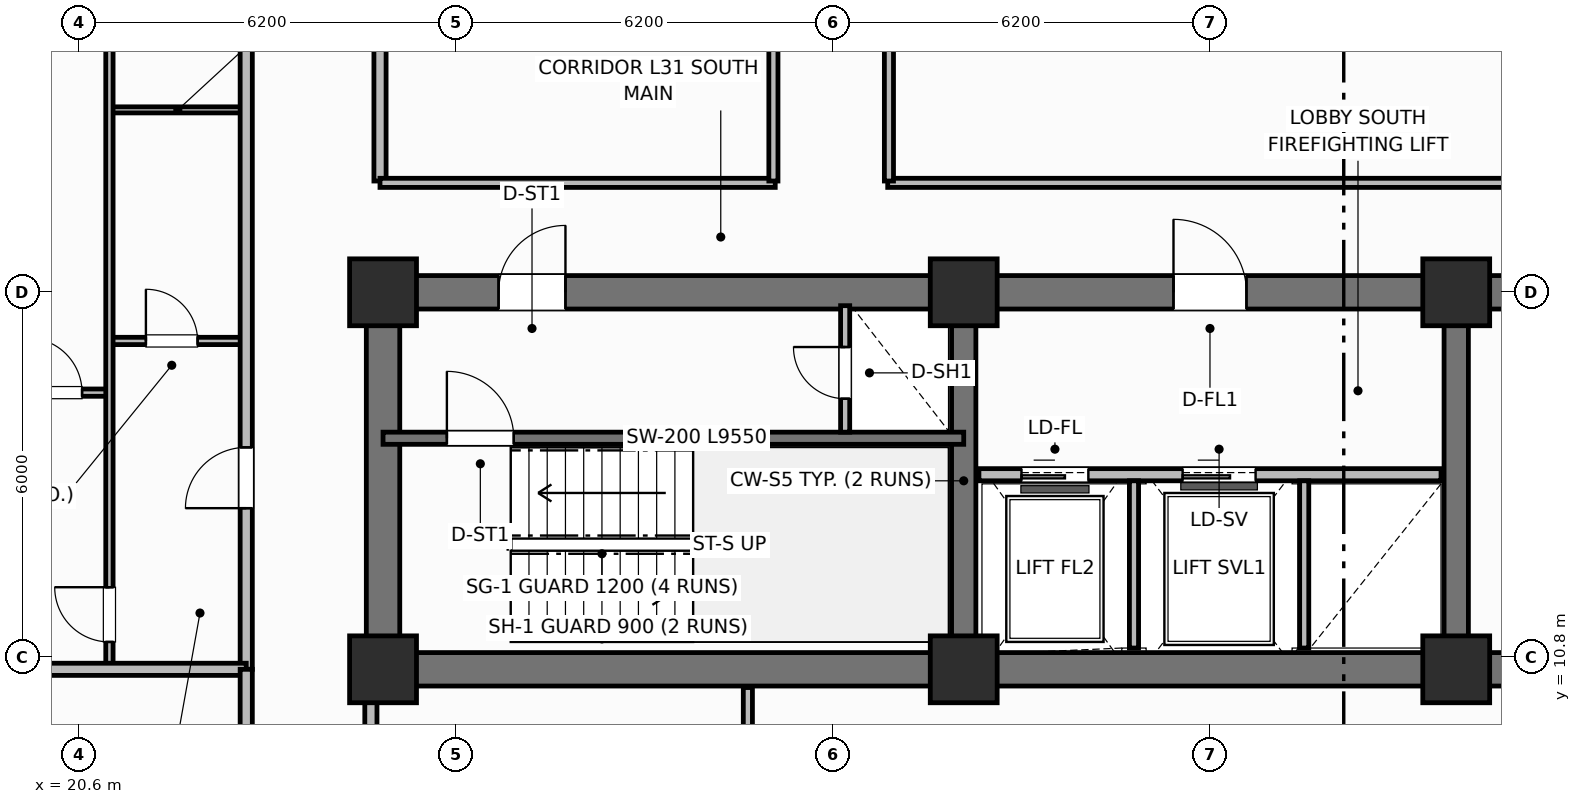
"""IFC4 building model, lengths in metres.
Left out: names, types, materials, properties, quantities, classifications, styles, units other than length and angle.
Written with IfcOpenShell. Run it as: python <this file> out.ifc"""

import sys

from ifc_helpers import new_model, si_unit, direction, frame, frame_2d, origin, origin_2d, place, context, subcontext, project, spatial, rectangle, extrude, element, fill, save


model = new_model("IFC4")
c1 = context("Model", 3, precision=1e-05, world=origin(), true_north=direction((0.0, 1.0)))
c2 = subcontext(c1, "Body", "Model", "MODEL_VIEW")
j1 = project(units=[si_unit("LENGTHUNIT", "METRE"), si_unit("PLANEANGLEUNIT", "RADIAN")], contexts=[c1])
p1 = place(None, origin())
s1 = spatial("IfcSite", under=j1, at=p1, CompositionType="ELEMENT")
p2 = place(p1, origin())
s2 = spatial("IfcBuilding", under=s1, at=p2, CompositionType="ELEMENT")
p3 = place(p2, frame((0.0, 0.0, 125.3)))
s3 = spatial("IfcBuildingStorey", under=s2, at=p3, CompositionType="ELEMENT", Elevation=125.3)
p4 = place(p3, frame((52.8, 10.6, 0.0), z_axis=(0.0, 0.0, 1.0), x_axis=(-1.0, 0.0, 0.0)))
e1 = element("IfcWall", 1, at=p4, inside=s3, PredefinedType="SHEAR", context=c2, shape_type="SweptSolid", body=[
    extrude(rectangle(XDim=27.2, YDim=0.55, at=frame_2d((13.6, 0.0))), origin(), (0.0, 0.0, 1.0), 3.7),
])
p5 = place(p3, frame((25.6, 10.875, 0.0), z_axis=(0.0, 0.0, 1.0), x_axis=(0.0, 1.0, 0.0)))
e2 = element("IfcWall", 2, at=p5, inside=s3, PredefinedType="SHEAR", context=c2, shape_type="SweptSolid", body=[
    extrude(rectangle(XDim=5.65, YDim=0.55, at=frame_2d((2.825, 0.0))), origin(), (0.0, 0.0, 1.0), 3.7),
])
p6 = place(p3, frame((25.6, 16.8, 0.0), z_axis=(0.0, 0.0, 1.0), x_axis=(1.0, 0.0, 0.0)))
e3 = element("IfcWall", 3, at=p6, inside=s3, PredefinedType="SHEAR", context=c2, shape_type="SweptSolid", body=[
    extrude(rectangle(XDim=27.2, YDim=0.55, at=frame_2d((13.6, 0.0))), origin(), (0.0, 0.0, 1.0), 3.7),
])
p7 = place(p6, frame((1.9, 0.0, 0.0)))
e4 = element("IfcOpeningElement", 4, at=p7, cuts=e3, PredefinedType="OPENING", context=c2, shape_type="SweptSolid", body=[
    extrude(rectangle(XDim=1.1, YDim=2.15, at=frame_2d((0.55, 1.075))), frame((0.0, 0.285, 0.0), z_axis=(0.0, -1.0, 0.0), x_axis=(1.0, 0.0, 0.0)), (0.0, 0.0, 1.0), 0.57),
])
p8 = place(p6, frame((13.0, 0.0, 0.0)))
e5 = element("IfcOpeningElement", 5, at=p8, cuts=e3, PredefinedType="OPENING", context=c2, shape_type="SweptSolid", body=[
    extrude(rectangle(XDim=1.2, YDim=2.15, at=frame_2d((0.6, 1.075))), frame((0.0, 0.285, 0.0), z_axis=(0.0, -1.0, 0.0), x_axis=(1.0, 0.0, 0.0)), (0.0, 0.0, 1.0), 0.57),
])
p9 = place(p6, frame((21.6, 0.0, 0.0)))
e6 = element("IfcOpeningElement", 6, at=p9, cuts=e3, PredefinedType="OPENING", context=c2, shape_type="SweptSolid", body=[
    extrude(rectangle(XDim=1.0, YDim=2.15, at=frame_2d((0.5, 1.075))), frame((0.0, 0.285, 0.0), z_axis=(0.0, -1.0, 0.0), x_axis=(1.0, 0.0, 0.0)), (0.0, 0.0, 1.0), 0.57),
])
for number, where, z_axis, x_axis in (
    (7, (35.15, 10.875, 0.0), (0.0, 0.0, 1.0), (0.0, 1.0, 0.0)),
    (8, (43.25, 10.875, 0.0), (0.0, 0.0, 1.0), (0.0, 1.0, 0.0)),
):
    element("IfcWall", number, at=place(p3, frame(where, z_axis=z_axis, x_axis=x_axis)), inside=s3, PredefinedType="SHEAR", context=c2, shape_type="SweptSolid", body=[
        extrude(rectangle(XDim=5.65, YDim=0.4, at=frame_2d((2.825, 0.0))), origin(), (0.0, 0.0, 1.0), 3.7),
    ])
for number, where, z_axis, x_axis in (
    (9, (25.6, 10.6, 0.0), (0.0, 0.0, 1.0), (1.0, 0.0, 0.0)),
    (10, (25.6, 16.8, 0.0), (0.0, 0.0, 1.0), (1.0, 0.0, 0.0)),
    (11, (35.15, 10.6, 0.0), (0.0, 0.0, 1.0), (1.0, 0.0, 0.0)),
    (12, (35.15, 16.8, 0.0), (0.0, 0.0, 1.0), (1.0, 0.0, 0.0)),
    (13, (43.25, 10.6, 0.0), (0.0, 0.0, 1.0), (1.0, 0.0, 0.0)),
    (14, (43.25, 16.8, 0.0), (0.0, 0.0, 1.0), (1.0, 0.0, 0.0)),
):
    element("IfcColumn", number, at=place(p3, frame(where, z_axis=z_axis, x_axis=x_axis)), inside=s3, PredefinedType="COLUMN", context=c2, shape_type="SweptSolid", body=[
        extrude(rectangle(XDim=1.1, YDim=1.1, at=origin_2d()), origin(), (0.0, 0.0, 1.0), 3.7),
    ])
p10 = place(p3, frame((25.6, 14.4, 0.0), z_axis=(0.0, 0.0, 1.0), x_axis=(1.0, 0.0, 0.0)))
e15 = element("IfcWall", 15, at=p10, inside=s3, PredefinedType="SHEAR", context=c2, shape_type="SweptSolid", body=[
    extrude(rectangle(XDim=9.55, YDim=0.2, at=frame_2d((4.775, 0.0))), origin(), (0.0, 0.0, 1.0), 3.7),
])
p11 = place(p10, frame((1.05, 0.0, 0.0)))
e16 = element("IfcOpeningElement", 16, at=p11, cuts=e15, PredefinedType="OPENING", context=c2, shape_type="SweptSolid", body=[
    extrude(rectangle(XDim=1.1, YDim=2.15, at=frame_2d((0.55, 1.075))), frame((0.0, 0.11, 0.0), z_axis=(0.0, -1.0, 0.0), x_axis=(1.0, 0.0, 0.0)), (0.0, 0.0, 1.0), 0.22),
])
p12 = place(p3, frame((33.2, 14.5, 0.0), z_axis=(0.0, 0.0, 1.0), x_axis=(0.0, 1.0, 0.0)))
e17 = element("IfcWall", 17, at=p12, inside=s3, PredefinedType="PARTITIONING", context=c2, shape_type="SweptSolid", body=[
    extrude(rectangle(XDim=2.08, YDim=0.15, at=frame_2d((1.04, 0.0))), origin(), (0.0, 0.0, 1.0), 2.53),
])
p13 = place(p12, frame((0.55, 0.0, 0.0)))
e18 = element("IfcOpeningElement", 18, at=p13, cuts=e17, PredefinedType="OPENING", context=c2, shape_type="SweptSolid", body=[
    extrude(rectangle(XDim=0.85, YDim=2.05, at=frame_2d((0.425, 1.025))), frame((0.0, 0.085, 0.0), z_axis=(0.0, -1.0, 0.0), x_axis=(1.0, 0.0, 0.0)), (0.0, 0.0, 1.0), 0.17),
])
p14 = place(p3, frame((35.4, 13.8, 0.0), z_axis=(0.0, 0.0, 1.0), x_axis=(1.0, 0.0, 0.0)))
e19 = element("IfcWall", 19, at=p14, inside=s3, PredefinedType="PARTITIONING", context=c2, shape_type="SweptSolid", body=[
    extrude(rectangle(XDim=7.6, YDim=0.2, at=frame_2d((3.8, 0.0))), origin(), (0.0, 0.0, 1.0), 2.3),
])
p15 = place(p14, frame((0.7, 0.0, 0.0)))
e20 = element("IfcOpeningElement", 20, at=p15, cuts=e19, PredefinedType="OPENING", context=c2, shape_type="SweptSolid", body=[
    extrude(rectangle(XDim=1.1, YDim=2.15, at=frame_2d((0.55, 1.075))), frame((0.0, 0.11, 0.0), z_axis=(0.0, -1.0, 0.0), x_axis=(1.0, 0.0, 0.0)), (0.0, 0.0, 1.0), 0.22),
])
p16 = place(p14, frame((3.35, 0.0, 0.0)))
e21 = element("IfcOpeningElement", 21, at=p16, cuts=e19, PredefinedType="OPENING", context=c2, shape_type="SweptSolid", body=[
    extrude(rectangle(XDim=1.2, YDim=2.15, at=frame_2d((0.6, 1.075))), frame((0.0, 0.11, 0.0), z_axis=(0.0, -1.0, 0.0), x_axis=(1.0, 0.0, 0.0)), (0.0, 0.0, 1.0), 0.22),
])
for number, where, z_axis, x_axis in (
    (22, (37.95, 10.95, 0.0), (0.0, 0.0, 1.0), (0.0, 1.0, 0.0)),
    (23, (40.75, 10.95, 0.0), (0.0, 0.0, 1.0), (0.0, 1.0, 0.0)),
):
    element("IfcWall", number, at=place(p3, frame(where, z_axis=z_axis, x_axis=x_axis)), inside=s3, PredefinedType="PARTITIONING", context=c2, shape_type="SweptSolid", body=[
        extrude(rectangle(XDim=2.75, YDim=0.15, at=frame_2d((1.375, 0.0))), origin(), (0.0, 0.0, 1.0), 2.53),
    ])
p17 = place(p3, frame((25.55, 18.63, 0.0), z_axis=(0.0, 0.0, 1.0), x_axis=(0.0, 1.0, 0.0)))
e24 = element("IfcWall", 24, at=p17, inside=s3, PredefinedType="PARTITIONING", context=c2, shape_type="SweptSolid", body=[
    extrude(rectangle(XDim=19.14, YDim=0.2, at=frame_2d((9.57, 0.0))), origin(), (0.0, 0.0, 1.0), 2.53),
])
p18 = place(p3, frame((25.55, 18.6, 0.0), z_axis=(0.0, 0.0, 1.0), x_axis=(1.0, 0.0, 0.0)))
e25 = element("IfcWall", 25, at=p18, inside=s3, PredefinedType="PARTITIONING", context=c2, shape_type="SweptSolid", body=[
    extrude(rectangle(XDim=6.5, YDim=0.15, at=frame_2d((3.25, 0.0))), origin(), (0.0, 0.0, 1.0), 2.53),
])
p19 = place(p3, frame((33.9, 18.6, 0.0), z_axis=(0.0, 0.0, 1.0), x_axis=(1.0, 0.0, 0.0)))
e26 = element("IfcWall", 26, at=p19, inside=s3, PredefinedType="PARTITIONING", context=c2, shape_type="SweptSolid", body=[
    extrude(rectangle(XDim=10.6, YDim=0.15, at=frame_2d((5.3, 0.0))), origin(), (0.0, 0.0, 1.0), 2.53),
])
p20 = place(p3, frame((32.02, 18.63, 0.0), z_axis=(0.0, 0.0, 1.0), x_axis=(0.0, 1.0, 0.0)))
e27 = element("IfcWall", 27, at=p20, inside=s3, PredefinedType="PARTITIONING", context=c2, shape_type="SweptSolid", body=[
    extrude(rectangle(XDim=19.14, YDim=0.15, at=frame_2d((9.57, 0.0))), origin(), (0.0, 0.0, 1.0), 2.53),
])
p21 = place(p20, frame((5.0, 0.0, 0.0)))
e28 = element("IfcOpeningElement", 28, at=p21, cuts=e27, PredefinedType="OPENING", context=c2, shape_type="SweptSolid", body=[
    extrude(rectangle(XDim=0.9, YDim=2.1, at=frame_2d((0.45, 1.05))), frame((0.0, 0.085, 0.0), z_axis=(0.0, -1.0, 0.0), x_axis=(1.0, 0.0, 0.0)), (0.0, 0.0, 1.0), 0.17),
])
p22 = place(p3, frame((33.92, 18.63, 0.0), z_axis=(0.0, 0.0, 1.0), x_axis=(0.0, 1.0, 0.0)))
e29 = element("IfcWall", 29, at=p22, inside=s3, PredefinedType="PARTITIONING", context=c2, shape_type="SweptSolid", body=[
    extrude(rectangle(XDim=19.14, YDim=0.15, at=frame_2d((9.57, 0.0))), origin(), (0.0, 0.0, 1.0), 2.53),
])
p23 = place(p22, frame((6.5, 0.0, 0.0)))
e30 = element("IfcOpeningElement", 30, at=p23, cuts=e29, PredefinedType="OPENING", context=c2, shape_type="SweptSolid", body=[
    extrude(rectangle(XDim=1.0, YDim=2.15, at=frame_2d((0.5, 1.075))), frame((0.0, 0.085, 0.0), z_axis=(0.0, -1.0, 0.0), x_axis=(1.0, 0.0, 0.0)), (0.0, 0.0, 1.0), 0.17),
])
p24 = place(p3, frame((21.1, 16.0, 0.0), z_axis=(0.0, 0.0, 1.0), x_axis=(1.0, 0.0, 0.0)))
e31 = element("IfcWall", 31, at=p24, inside=s3, PredefinedType="PARTITIONING", context=c2, shape_type="SweptSolid", body=[
    extrude(rectangle(XDim=2.25, YDim=0.12, at=frame_2d((1.125, 0.0))), origin(), (0.0, 0.0, 1.0), 2.53),
])
p25 = place(p24, frame((0.6, 0.0, 0.0)))
e32 = element("IfcOpeningElement", 32, at=p25, cuts=e31, PredefinedType="OPENING", context=c2, shape_type="SweptSolid", body=[
    extrude(rectangle(XDim=0.85, YDim=2.1, at=frame_2d((0.425, 1.05))), frame((0.0, 0.07, 0.0), z_axis=(0.0, -1.0, 0.0), x_axis=(1.0, 0.0, 0.0)), (0.0, 0.0, 1.0), 0.14),
])
p26 = place(p3, frame((21.1, 19.8, 0.0), z_axis=(0.0, 0.0, 1.0), x_axis=(1.0, 0.0, 0.0)))
e33 = element("IfcWall", 33, at=p26, inside=s3, PredefinedType="PARTITIONING", context=c2, shape_type="SweptSolid", body=[
    extrude(rectangle(XDim=2.25, YDim=0.1, at=frame_2d((1.125, 0.0))), origin(), (0.0, 0.0, 1.0), 2.53),
])
p27 = place(p3, frame((14.57, 15.15, 0.0), z_axis=(0.0, 0.0, 1.0), x_axis=(1.0, 0.0, 0.0)))
e34 = element("IfcWall", 34, at=p27, inside=s3, PredefinedType="PARTITIONING", context=c2, shape_type="SweptSolid", body=[
    extrude(rectangle(XDim=6.53, YDim=0.12, at=frame_2d((3.265, 0.0))), origin(), (0.0, 0.0, 1.0), 2.53),
])
p28 = place(p27, frame((5.18, 0.0, 0.0)))
e35 = element("IfcOpeningElement", 35, at=p28, cuts=e34, PredefinedType="OPENING", context=c2, shape_type="SweptSolid", body=[
    extrude(rectangle(XDim=0.9, YDim=2.1, at=frame_2d((0.45, 1.05))), frame((0.0, 0.07, 0.0), z_axis=(0.0, -1.0, 0.0), x_axis=(1.0, 0.0, 0.0)), (0.0, 0.0, 1.0), 0.14),
])
p29 = place(p3, frame((21.1, 10.64, 0.0), z_axis=(0.0, 0.0, 1.0), x_axis=(0.0, 1.0, 0.0)))
e36 = element("IfcWall", 36, at=p29, inside=s3, PredefinedType="PARTITIONING", context=c2, shape_type="SweptSolid", body=[
    extrude(rectangle(XDim=15.92, YDim=0.12, at=frame_2d((7.96, 0.0))), origin(), (0.0, 0.0, 1.0), 2.53),
])
p30 = place(p29, frame((0.41, 0.0, 0.0)))
e37 = element("IfcOpeningElement", 37, at=p30, cuts=e36, PredefinedType="OPENING", context=c2, shape_type="SweptSolid", body=[
    extrude(rectangle(XDim=0.9, YDim=2.1, at=frame_2d((0.45, 1.05))), frame((0.0, 0.07, 0.0), z_axis=(0.0, -1.0, 0.0), x_axis=(1.0, 0.0, 0.0)), (0.0, 0.0, 1.0), 0.14),
])
p31 = place(p29, frame((13.125, 0.0, 0.0)))
e38 = element("IfcOpeningElement", 38, at=p31, cuts=e36, PredefinedType="OPENING", context=c2, shape_type="SweptSolid", body=[
    extrude(rectangle(XDim=0.82, YDim=2.08, at=frame_2d((0.41, 1.04))), frame((0.0, 0.07, 0.0), z_axis=(0.0, -1.0, 0.0), x_axis=(1.0, 0.0, 0.0)), (0.0, 0.0, 1.0), 0.14),
])
p32 = place(p3, frame((23.35, 10.6, 0.0), z_axis=(0.0, 0.0, 1.0), x_axis=(0.0, 1.0, 0.0)))
e39 = element("IfcWall", 39, at=p32, inside=s3, PredefinedType="PARTITIONING", context=c2, shape_type="SweptSolid", body=[
    extrude(rectangle(XDim=35.2, YDim=0.2, at=frame_2d((17.6, 0.0))), origin(), (0.0, 0.0, 1.0), 2.53),
])
p33 = place(p32, frame((2.65, 0.0, 0.0)))
e40 = element("IfcOpeningElement", 40, at=p33, cuts=e39, PredefinedType="OPENING", context=c2, shape_type="SweptSolid", body=[
    extrude(rectangle(XDim=1.0, YDim=2.15, at=frame_2d((0.5, 1.075))), frame((0.0, 0.11, 0.0), z_axis=(0.0, -1.0, 0.0), x_axis=(1.0, 0.0, 0.0)), (0.0, 0.0, 1.0), 0.22),
])
p34 = place(p32, frame((19.95, 0.0, 0.0)))
e41 = element("IfcOpeningElement", 41, at=p34, cuts=e39, PredefinedType="OPENING", context=c2, shape_type="SweptSolid", body=[
    extrude(rectangle(XDim=1.0, YDim=2.15, at=frame_2d((0.5, 1.075))), frame((0.0, 0.11, 0.0), z_axis=(0.0, -1.0, 0.0), x_axis=(1.0, 0.0, 0.0)), (0.0, 0.0, 1.0), 0.22),
])
p35 = place(p3, frame((14.99, 10.6, 0.0), z_axis=(0.0, 0.0, 1.0), x_axis=(1.0, 0.0, 0.0)))
e42 = element("IfcWall", 42, at=p35, inside=s3, PredefinedType="PARTITIONING", context=c2, shape_type="SweptSolid", body=[
    extrude(rectangle(XDim=8.36, YDim=0.2, at=frame_2d((4.18, 0.0))), origin(), (0.0, 0.0, 1.0), 2.53),
])
p36 = place(p3, frame((23.35, 4.97, 0.0), z_axis=(0.0, 0.0, 1.0), x_axis=(0.0, 1.0, 0.0)))
e43 = element("IfcWall", 43, at=p36, inside=s3, PredefinedType="PARTITIONING", context=c2, shape_type="SweptSolid", body=[
    extrude(rectangle(XDim=5.63, YDim=0.2, at=frame_2d((2.815, 0.0))), origin(), (0.0, 0.0, 1.0), 2.53),
])
p37 = place(p3, frame((31.6, 4.97, 0.0), z_axis=(0.0, 0.0, 1.0), x_axis=(0.0, 1.0, 0.0)))
e44 = element("IfcWall", 44, at=p37, inside=s3, PredefinedType="PARTITIONING", context=c2, shape_type="SweptSolid", body=[
    extrude(rectangle(XDim=5.33, YDim=0.15, at=frame_2d((2.665, 0.0))), origin(), (0.0, 0.0, 1.0), 2.53),
])
p38 = place(p37, frame((1.45, 0.0, 0.0)))
e45 = element("IfcOpeningElement", 45, at=p38, cuts=e44, PredefinedType="OPENING", context=c2, shape_type="SweptSolid", body=[
    extrude(rectangle(XDim=0.9, YDim=2.1, at=frame_2d((0.45, 1.05))), frame((0.0, 0.085, 0.0), z_axis=(0.0, -1.0, 0.0), x_axis=(1.0, 0.0, 0.0)), (0.0, 0.0, 1.0), 0.17),
])
p39 = place(p3, frame((25.4, 5.77, 0.0), z_axis=(0.0, 0.0, 1.0), x_axis=(0.0, 1.0, 0.0)))
e46 = element("IfcWall", 46, at=p39, inside=s3, PredefinedType="PARTITIONING", context=c2, shape_type="SweptSolid", body=[
    extrude(rectangle(XDim=4.53, YDim=0.2, at=frame_2d((2.265, 0.0))), origin(), (0.0, 0.0, 1.0), 2.53),
])
p40 = place(p39, frame((1.05, 0.0, 0.0)))
e47 = element("IfcOpeningElement", 47, at=p40, cuts=e46, PredefinedType="OPENING", context=c2, shape_type="SweptSolid", body=[
    extrude(rectangle(XDim=0.9, YDim=2.1, at=frame_2d((0.45, 1.05))), frame((0.0, 0.11, 0.0), z_axis=(0.0, -1.0, 0.0), x_axis=(1.0, 0.0, 0.0)), (0.0, 0.0, 1.0), 0.22),
])
p41 = place(p11, origin())
e48 = element("IfcDoor", 48, at=p41, inside=s3, OperationType="SINGLE_SWING_LEFT", PredefinedType="DOOR", context=c2, shape_type="SweptSolid", body=[
    extrude(rectangle(XDim=1.1, YDim=2.15, at=frame_2d((0.55, 1.075))), frame((0.0, 0.025, 0.0), z_axis=(0.0, -1.0, 0.0), x_axis=(1.0, 0.0, 0.0)), (0.0, 0.0, 1.0), 0.05),
])
fill(e16, e48)
p42 = place(p13, origin())
e49 = element("IfcDoor", 49, at=p42, inside=s3, OperationType="SINGLE_SWING_RIGHT", PredefinedType="TRAPDOOR", context=c2, shape_type="SweptSolid", body=[
    extrude(rectangle(XDim=0.85, YDim=2.05, at=frame_2d((0.425, 1.025))), frame((0.0, 0.025, 0.0), z_axis=(0.0, -1.0, 0.0), x_axis=(1.0, 0.0, 0.0)), (0.0, 0.0, 1.0), 0.05),
])
fill(e18, e49)
p43 = place(p15, origin())
e50 = element("IfcDoor", 50, at=p43, inside=s3, OperationType="SLIDING_TO_LEFT", PredefinedType="DOOR", context=c2, shape_type="SweptSolid", body=[
    extrude(rectangle(XDim=1.1, YDim=2.15, at=frame_2d((0.55, 1.075))), frame((0.0, 0.025, 0.0), z_axis=(0.0, -1.0, 0.0), x_axis=(1.0, 0.0, 0.0)), (0.0, 0.0, 1.0), 0.05),
])
fill(e20, e50)
p44 = place(p16, origin())
e51 = element("IfcDoor", 51, at=p44, inside=s3, OperationType="SLIDING_TO_LEFT", PredefinedType="DOOR", context=c2, shape_type="SweptSolid", body=[
    extrude(rectangle(XDim=1.2, YDim=2.15, at=frame_2d((0.6, 1.075))), frame((0.0, 0.025, 0.0), z_axis=(0.0, -1.0, 0.0), x_axis=(1.0, 0.0, 0.0)), (0.0, 0.0, 1.0), 0.05),
])
fill(e21, e51)
p45 = place(p25, origin())
e52 = element("IfcDoor", 52, at=p45, inside=s3, OperationType="SINGLE_SWING_LEFT", PredefinedType="DOOR", context=c2, shape_type="SweptSolid", body=[
    extrude(rectangle(XDim=0.85, YDim=2.1, at=frame_2d((0.425, 1.05))), frame((0.0, 0.025, 0.0), z_axis=(0.0, -1.0, 0.0), x_axis=(1.0, 0.0, 0.0)), (0.0, 0.0, 1.0), 0.05),
])
fill(e32, e52)
p46 = place(p28, origin())
e53 = element("IfcDoor", 53, at=p46, inside=s3, OperationType="SINGLE_SWING_LEFT", PredefinedType="DOOR", context=c2, shape_type="SweptSolid", body=[
    extrude(rectangle(XDim=0.9, YDim=2.1, at=frame_2d((0.45, 1.05))), frame((0.0, 0.025, 0.0), z_axis=(0.0, -1.0, 0.0), x_axis=(1.0, 0.0, 0.0)), (0.0, 0.0, 1.0), 0.05),
])
fill(e35, e53)
p47 = place(p30, origin())
e54 = element("IfcDoor", 54, at=p47, inside=s3, OperationType="SINGLE_SWING_RIGHT", PredefinedType="DOOR", context=c2, shape_type="SweptSolid", body=[
    extrude(rectangle(XDim=0.9, YDim=2.1, at=frame_2d((0.45, 1.05))), frame((0.0, 0.025, 0.0), z_axis=(0.0, -1.0, 0.0), x_axis=(1.0, 0.0, 0.0)), (0.0, 0.0, 1.0), 0.05),
])
fill(e37, e54)
p48 = place(p33, origin())
e55 = element("IfcDoor", 55, at=p48, inside=s3, OperationType="SINGLE_SWING_LEFT", PredefinedType="DOOR", context=c2, shape_type="SweptSolid", body=[
    extrude(rectangle(XDim=1.0, YDim=2.15, at=frame_2d((0.5, 1.075))), frame((0.0, 0.025, 0.0), z_axis=(0.0, -1.0, 0.0), x_axis=(1.0, 0.0, 0.0)), (0.0, 0.0, 1.0), 0.05),
])
fill(e40, e55)
p49 = place(p7, origin())
e56 = element("IfcDoor", 56, at=p49, inside=s3, OperationType="SINGLE_SWING_RIGHT", PredefinedType="DOOR", context=c2, shape_type="SweptSolid", body=[
    extrude(rectangle(XDim=1.1, YDim=2.15, at=frame_2d((0.55, 1.075))), frame((0.0, 0.025, 0.0), z_axis=(0.0, -1.0, 0.0), x_axis=(1.0, 0.0, 0.0)), (0.0, 0.0, 1.0), 0.05),
])
fill(e4, e56)
p50 = place(p8, origin())
e57 = element("IfcDoor", 57, at=p50, inside=s3, OperationType="SINGLE_SWING_LEFT", PredefinedType="DOOR", context=c2, shape_type="SweptSolid", body=[
    extrude(rectangle(XDim=1.2, YDim=2.15, at=frame_2d((0.6, 1.075))), frame((0.0, 0.025, 0.0), z_axis=(0.0, -1.0, 0.0), x_axis=(1.0, 0.0, 0.0)), (0.0, 0.0, 1.0), 0.05),
])
fill(e5, e57)
save(model, sys.argv[1])
